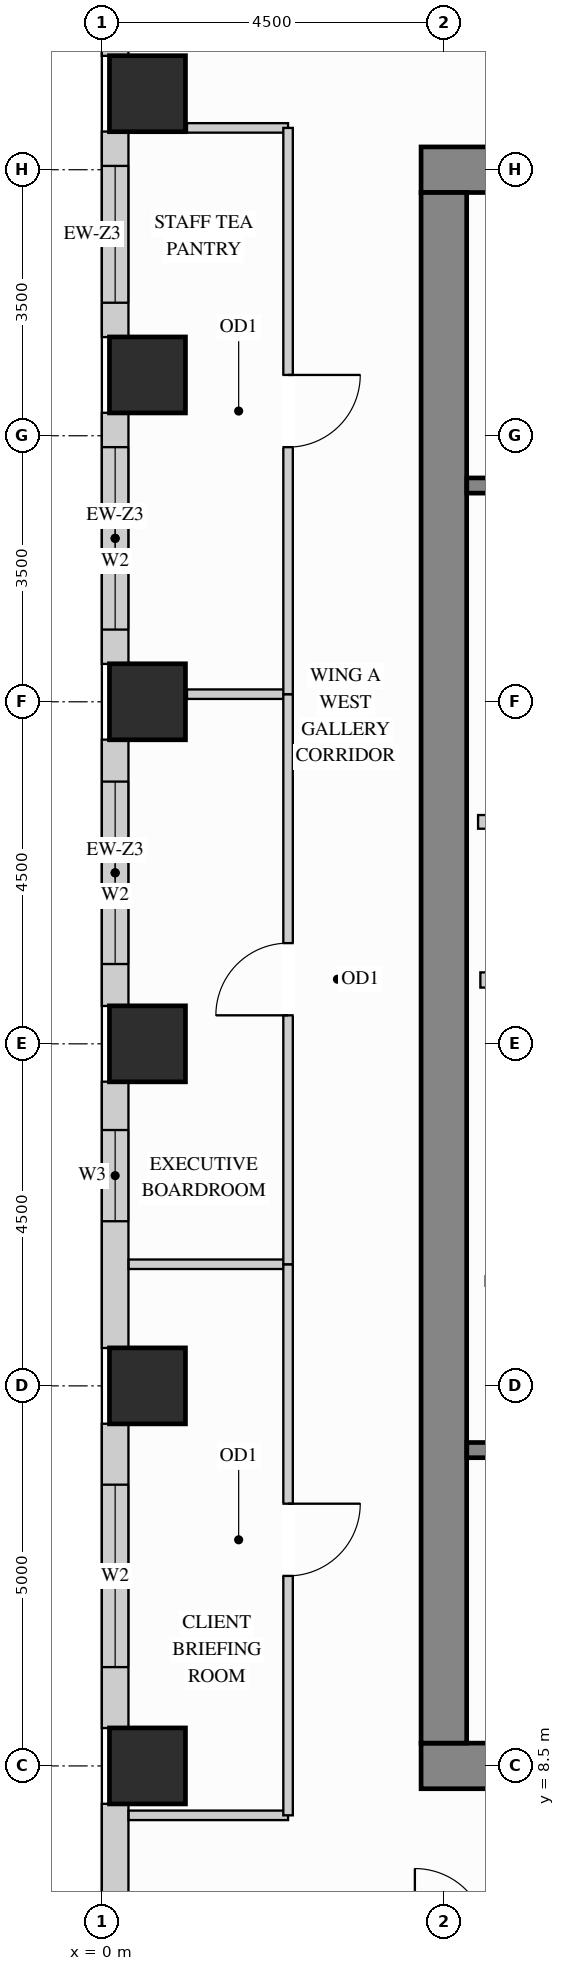
"""IFC4 building model, lengths in metres.
Left out: names, types, materials, properties, quantities, classifications, styles, units other than length and angle.
Written with IfcOpenShell. Run it as: python <this file> out.ifc"""

import sys

from ifc_helpers import new_model, si_unit, direction, frame, frame_2d, origin, origin_2d, place, context, subcontext, project, spatial, rectangle, extrude, source, transform, mapped, element, fill, save


model = new_model("IFC4")
c1 = context("Model", 3, precision=1e-05, world=origin(), true_north=direction((0.0, 1.0)))
c2 = subcontext(c1, "Body", "Model", "MODEL_VIEW")
j1 = project(units=[si_unit("LENGTHUNIT", "METRE"), si_unit("PLANEANGLEUNIT", "RADIAN")], contexts=[c1])
p1 = place(None, origin())
s1 = spatial("IfcSite", under=j1, at=p1, CompositionType="ELEMENT")
p2 = place(p1, origin())
s2 = spatial("IfcBuilding", under=s1, at=p2, CompositionType="ELEMENT")
p3 = place(p2, frame((0.0, 0.0, 189.9)))
s3 = spatial("IfcBuildingStorey", under=s2, at=p3, CompositionType="ELEMENT", Elevation=189.9)
m1 = source(origin(), c2, "Body", "SweptSolid", [
    extrude(rectangle(XDim=1.0, YDim=1.0, at=origin_2d()), origin(), (0.0, 0.0, 1.0), 3.4),
])
for number, where, z_axis, x_axis in (
    (1, (0.6, 13.5, 0.0), (0.0, 0.0, 1.0), (1.0, 0.0, 0.0)),
    (2, (0.6, 18.0, 0.0), (0.0, 0.0, 1.0), (1.0, 0.0, 0.0)),
    (3, (0.6, 22.5, 0.0), (0.0, 0.0, 1.0), (1.0, 0.0, 0.0)),
    (4, (0.6, 26.8, 0.0), (0.0, 0.0, 1.0), (1.0, 0.0, 0.0)),
    (5, (0.6, 30.5, 0.0), (0.0, 0.0, 1.0), (1.0, 0.0, 0.0)),
    (6, (0.6, 8.5, 0.0), (0.0, 0.0, 1.0), (1.0, 0.0, 0.0)),
):
    element("IfcColumn", number, at=place(p3, frame(where, z_axis=z_axis, x_axis=x_axis)), inside=s3, PredefinedType="COLUMN", context=c2, shape_type="MappedRepresentation", body=[
        mapped(m1, transform((0.0, 0.0, 0.0), x_axis=(1.0, 0.0, 0.0), y_axis=(0.0, 1.0, 0.0), z_axis=(0.0, 0.0, 1.0))),
    ])
m2 = source(origin(), c2, "Body", "SweptSolid", [
    extrude(rectangle(XDim=10.6, YDim=0.6, at=frame_2d((5.3, 0.0))), origin(), (0.0, 0.0, 1.0), 3.4),
])
for number, where, z_axis, x_axis in (
    (7, (4.2, 29.5, 0.0), (0.0, 0.0, 1.0), (1.0, 0.0, 0.0)),
    (8, (4.2, 8.5, 0.0), (0.0, 0.0, 1.0), (1.0, 0.0, 0.0)),
):
    element("IfcWall", number, at=place(p3, frame(where, z_axis=z_axis, x_axis=x_axis)), inside=s3, PredefinedType="SHEAR", context=c2, shape_type="MappedRepresentation", body=[
        mapped(m2, transform((0.0, 0.0, 0.0), x_axis=(1.0, 0.0, 0.0), y_axis=(0.0, 1.0, 0.0), z_axis=(0.0, 0.0, 1.0))),
    ])
m3 = source(origin(), c2, "Body", "SweptSolid", [
    extrude(rectangle(XDim=20.4, YDim=0.6, at=frame_2d((10.2, 0.0))), origin(), (0.0, 0.0, 1.0), 3.4),
])
p4 = place(p3, frame((4.5, 8.8, 0.0), z_axis=(0.0, 0.0, 1.0), x_axis=(0.0, 1.0, 0.0)))
e9 = element("IfcWall", 9, at=p4, inside=s3, PredefinedType="SHEAR", context=c2, shape_type="MappedRepresentation", body=[
    mapped(m3, transform((0.0, 0.0, 0.0), x_axis=(1.0, 0.0, 0.0), y_axis=(0.0, 1.0, 0.0), z_axis=(0.0, 0.0, 1.0))),
])
p5 = place(p3, frame((0.175, 34.502, 0.0), z_axis=(0.0, 0.0, 1.0), x_axis=(0.0, -1.0, 0.0)))
e10 = element("IfcWall", 10, at=p5, inside=s3, PredefinedType="SOLIDWALL", context=c2, shape_type="SweptSolid", body=[
    extrude(rectangle(XDim=3.504, YDim=0.35, at=frame_2d((1.752, 0.0))), origin(), (0.0, 0.0, 1.0), 2.612),
])
p6 = place(p5, frame((0.611, 0.0, 0.78)))
e11 = element("IfcOpeningElement", 11, at=p6, cuts=e10, PredefinedType="OPENING", context=c2, shape_type="SweptSolid", body=[
    extrude(rectangle(XDim=1.8, YDim=1.652, at=frame_2d((0.9, 0.826))), frame((0.0, 0.185, 0.0), z_axis=(0.0, -1.0, 0.0), x_axis=(1.0, 0.0, 0.0)), (0.0, 0.0, 1.0), 0.37),
])
p7 = place(p3, frame((0.175, 30.002, 0.0), z_axis=(0.0, 0.0, 1.0), x_axis=(0.0, -1.0, 0.0)))
e12 = element("IfcWall", 12, at=p7, inside=s3, PredefinedType="SOLIDWALL", context=c2, shape_type="SweptSolid", body=[
    extrude(rectangle(XDim=2.704, YDim=0.35, at=frame_2d((1.352, 0.0))), origin(), (0.0, 0.0, 1.0), 2.612),
])
p8 = place(p7, frame((0.452, 0.0, 0.78)))
e13 = element("IfcOpeningElement", 13, at=p8, cuts=e12, PredefinedType="OPENING", context=c2, shape_type="SweptSolid", body=[
    extrude(rectangle(XDim=1.8, YDim=1.652, at=frame_2d((0.9, 0.826))), frame((0.0, 0.185, 0.0), z_axis=(0.0, -1.0, 0.0), x_axis=(1.0, 0.0, 0.0)), (0.0, 0.0, 1.0), 0.37),
])
p9 = place(p3, frame((0.175, 26.302, 0.0), z_axis=(0.0, 0.0, 1.0), x_axis=(0.0, -1.0, 0.0)))
e14 = element("IfcWall", 14, at=p9, inside=s3, PredefinedType="SOLIDWALL", context=c2, shape_type="SweptSolid", body=[
    extrude(rectangle(XDim=3.304, YDim=0.35, at=frame_2d((1.652, 0.0))), origin(), (0.0, 0.0, 1.0), 2.612),
])
p10 = place(p9, frame((0.452, 0.0, 0.78)))
e15 = element("IfcOpeningElement", 15, at=p10, cuts=e14, PredefinedType="OPENING", context=c2, shape_type="SweptSolid", body=[
    extrude(rectangle(XDim=2.4, YDim=1.652, at=frame_2d((1.2, 0.826))), frame((0.0, 0.185, 0.0), z_axis=(0.0, -1.0, 0.0), x_axis=(1.0, 0.0, 0.0)), (0.0, 0.0, 1.0), 0.37),
])
p11 = place(p3, frame((0.175, 22.002, 0.0), z_axis=(0.0, 0.0, 1.0), x_axis=(0.0, -1.0, 0.0)))
e16 = element("IfcWall", 16, at=p11, inside=s3, PredefinedType="SOLIDWALL", context=c2, shape_type="SweptSolid", body=[
    extrude(rectangle(XDim=3.504, YDim=0.35, at=frame_2d((1.752, 0.0))), origin(), (0.0, 0.0, 1.0), 2.612),
])
p12 = place(p11, frame((0.552, 0.0, 0.78)))
e17 = element("IfcOpeningElement", 17, at=p12, cuts=e16, PredefinedType="OPENING", context=c2, shape_type="SweptSolid", body=[
    extrude(rectangle(XDim=2.4, YDim=1.652, at=frame_2d((1.2, 0.826))), frame((0.0, 0.185, 0.0), z_axis=(0.0, -1.0, 0.0), x_axis=(1.0, 0.0, 0.0)), (0.0, 0.0, 1.0), 0.37),
])
p13 = place(p3, frame((0.175, 17.502, 0.0), z_axis=(0.0, 0.0, 1.0), x_axis=(0.0, -1.0, 0.0)))
e18 = element("IfcWall", 18, at=p13, inside=s3, PredefinedType="SOLIDWALL", context=c2, shape_type="SweptSolid", body=[
    extrude(rectangle(XDim=3.504, YDim=0.35, at=frame_2d((1.752, 0.0))), origin(), (0.0, 0.0, 1.0), 2.612),
])
p14 = place(p13, frame((0.636, 0.0, 0.78)))
e19 = element("IfcOpeningElement", 19, at=p14, cuts=e18, PredefinedType="OPENING", context=c2, shape_type="SweptSolid", body=[
    extrude(rectangle(XDim=1.2, YDim=1.652, at=frame_2d((0.6, 0.826))), frame((0.0, 0.185, 0.0), z_axis=(0.0, -1.0, 0.0), x_axis=(1.0, 0.0, 0.0)), (0.0, 0.0, 1.0), 0.37),
])
p15 = place(p3, frame((0.175, 13.002, 0.0), z_axis=(0.0, 0.0, 1.0), x_axis=(0.0, -1.0, 0.0)))
e20 = element("IfcWall", 20, at=p15, inside=s3, PredefinedType="SOLIDWALL", context=c2, shape_type="SweptSolid", body=[
    extrude(rectangle(XDim=4.004, YDim=0.35, at=frame_2d((2.002, 0.0))), origin(), (0.0, 0.0, 1.0), 2.612),
])
p16 = place(p15, frame((0.802, 0.0, 0.78)))
e21 = element("IfcOpeningElement", 21, at=p16, cuts=e20, PredefinedType="OPENING", context=c2, shape_type="SweptSolid", body=[
    extrude(rectangle(XDim=2.4, YDim=1.652, at=frame_2d((1.2, 0.826))), frame((0.0, 0.185, 0.0), z_axis=(0.0, -1.0, 0.0), x_axis=(1.0, 0.0, 0.0)), (0.0, 0.0, 1.0), 0.37),
])
p17 = place(p3, frame((0.175, 8.002, 0.0), z_axis=(0.0, 0.0, 1.0), x_axis=(0.0, -1.0, 0.0)))
e22 = element("IfcWall", 22, at=p17, inside=s3, PredefinedType="SOLIDWALL", context=c2, shape_type="SweptSolid", body=[
    extrude(rectangle(XDim=4.004, YDim=0.35, at=frame_2d((2.002, 0.0))), origin(), (0.0, 0.0, 1.0), 2.612),
])
p18 = place(p17, frame((2.268, 0.0, 0.78)))
e23 = element("IfcOpeningElement", 23, at=p18, cuts=e22, PredefinedType="OPENING", context=c2, shape_type="SweptSolid", body=[
    extrude(rectangle(XDim=1.2, YDim=1.652, at=frame_2d((0.6, 0.826))), frame((0.0, 0.185, 0.0), z_axis=(0.0, -1.0, 0.0), x_axis=(1.0, 0.0, 0.0)), (0.0, 0.0, 1.0), 0.37),
])
m4 = source(origin(), c2, "Body", "SweptSolid", [
    extrude(rectangle(XDim=2.2, YDim=0.18, at=frame_2d((1.1, 0.0))), origin(), (0.0, 0.0, 1.0), 3.385),
])
p19 = place(p3, frame((4.95, 20.92, 0.0), z_axis=(0.0, 0.0, 1.0), x_axis=(1.0, 0.0, 0.0)))
e24 = element("IfcWall", 24, at=p19, inside=s3, PredefinedType="PARTITIONING", context=c2, shape_type="MappedRepresentation", body=[
    mapped(m4, transform((0.0, 0.0, 0.0), x_axis=(1.0, 0.0, 0.0), y_axis=(0.0, 1.0, 0.0), z_axis=(0.0, 0.0, 1.0))),
])
p20 = place(p3, frame((5.05, 14.88, 0.0), z_axis=(0.0, 0.0, 1.0), x_axis=(1.0, 0.0, 0.0)))
e25 = element("IfcWall", 25, at=p20, inside=s3, PredefinedType="PARTITIONING", context=c2, shape_type="SweptSolid", body=[
    extrude(rectangle(XDim=2.35, YDim=0.125, at=frame_2d((1.175, 0.0))), origin(), (0.0, 0.0, 1.0), 3.385),
])
p21 = place(p20, frame((0.7, 0.0, 0.0)))
e26 = element("IfcOpeningElement", 26, at=p21, cuts=e25, PredefinedType="OPENING", context=c2, shape_type="SweptSolid", body=[
    extrude(rectangle(XDim=0.85, YDim=2.1, at=frame_2d((0.425, 1.05))), frame((0.0, 0.073, 0.0), z_axis=(0.0, -1.0, 0.0), x_axis=(1.0, 0.0, 0.0)), (0.0, 0.0, 1.0), 0.145),
])
m5 = source(origin(), c2, "Body", "SweptSolid", [
    extrude(rectangle(XDim=1.33, YDim=0.125, at=frame_2d((0.665, 0.0))), origin(), (0.0, 0.0, 1.0), 3.385),
])
p22 = place(p3, frame((1.12, 30.05, 0.0), z_axis=(0.0, 0.0, 1.0), x_axis=(1.0, 0.0, 0.0)))
e27 = element("IfcWall", 27, at=p22, inside=s3, PredefinedType="PARTITIONING", context=c2, shape_type="MappedRepresentation", body=[
    mapped(m5, transform((0.0, 0.0, 0.0), x_axis=(1.0, 0.0, 0.0), y_axis=(0.0, 1.0, 0.0), z_axis=(0.0, 0.0, 1.0))),
])
m6 = source(origin(), c2, "Body", "SweptSolid", [
    extrude(rectangle(XDim=2.098, YDim=0.125, at=frame_2d((1.049, 0.0))), origin(), (0.0, 0.0, 1.0), 3.385),
])
for number, where, z_axis, x_axis in (
    (28, (0.352, 7.85, 0.0), (0.0, 0.0, 1.0), (1.0, 0.0, 0.0)),
    (29, (0.352, 15.1, 0.0), (0.0, 0.0, 1.0), (1.0, 0.0, 0.0)),
):
    element("IfcWall", number, at=place(p3, frame(where, z_axis=z_axis, x_axis=x_axis)), inside=s3, PredefinedType="PARTITIONING", context=c2, shape_type="MappedRepresentation", body=[
        mapped(m6, transform((0.0, 0.0, 0.0), x_axis=(1.0, 0.0, 0.0), y_axis=(0.0, 1.0, 0.0), z_axis=(0.0, 0.0, 1.0))),
    ])
p23 = place(p3, frame((1.12, 22.6, 0.0), z_axis=(0.0, 0.0, 1.0), x_axis=(1.0, 0.0, 0.0)))
e30 = element("IfcWall", 30, at=p23, inside=s3, PredefinedType="PARTITIONING", context=c2, shape_type="MappedRepresentation", body=[
    mapped(m5, transform((0.0, 0.0, 0.0), x_axis=(1.0, 0.0, 0.0), y_axis=(0.0, 1.0, 0.0), z_axis=(0.0, 0.0, 1.0))),
])
p24 = place(p3, frame((2.45, 7.85, 0.0), z_axis=(0.0, 0.0, 1.0), x_axis=(0.0, 1.0, 0.0)))
e31 = element("IfcWall", 31, at=p24, inside=s3, PredefinedType="PARTITIONING", context=c2, shape_type="SweptSolid", body=[
    extrude(rectangle(XDim=7.25, YDim=0.125, at=frame_2d((3.625, 0.0))), origin(), (0.0, 0.0, 1.0), 3.385),
])
p25 = place(p24, frame((3.15, 0.0, 0.0)))
e32 = element("IfcOpeningElement", 32, at=p25, cuts=e31, PredefinedType="OPENING", context=c2, shape_type="SweptSolid", body=[
    extrude(rectangle(XDim=0.95, YDim=2.15, at=frame_2d((0.475, 1.075))), frame((0.0, 0.073, 0.0), z_axis=(0.0, -1.0, 0.0), x_axis=(1.0, 0.0, 0.0)), (0.0, 0.0, 1.0), 0.145),
])
p26 = place(p3, frame((2.45, 15.1, 0.0), z_axis=(0.0, 0.0, 1.0), x_axis=(0.0, 1.0, 0.0)))
e33 = element("IfcWall", 33, at=p26, inside=s3, PredefinedType="PARTITIONING", context=c2, shape_type="SweptSolid", body=[
    extrude(rectangle(XDim=7.5, YDim=0.125, at=frame_2d((3.75, 0.0))), origin(), (0.0, 0.0, 1.0), 3.385),
])
p27 = place(p26, frame((3.275, 0.0, 0.0)))
e34 = element("IfcOpeningElement", 34, at=p27, cuts=e33, PredefinedType="OPENING", context=c2, shape_type="SweptSolid", body=[
    extrude(rectangle(XDim=0.95, YDim=2.15, at=frame_2d((0.475, 1.075))), frame((0.0, 0.073, 0.0), z_axis=(0.0, -1.0, 0.0), x_axis=(1.0, 0.0, 0.0)), (0.0, 0.0, 1.0), 0.145),
])
p28 = place(p3, frame((2.45, 22.6, 0.0), z_axis=(0.0, 0.0, 1.0), x_axis=(0.0, 1.0, 0.0)))
e35 = element("IfcWall", 35, at=p28, inside=s3, PredefinedType="PARTITIONING", context=c2, shape_type="SweptSolid", body=[
    extrude(rectangle(XDim=7.45, YDim=0.125, at=frame_2d((3.725, 0.0))), origin(), (0.0, 0.0, 1.0), 3.385),
])
p29 = place(p28, frame((3.25, 0.0, 0.0)))
e36 = element("IfcOpeningElement", 36, at=p29, cuts=e35, PredefinedType="OPENING", context=c2, shape_type="SweptSolid", body=[
    extrude(rectangle(XDim=0.95, YDim=2.15, at=frame_2d((0.475, 1.075))), frame((0.0, 0.073, 0.0), z_axis=(0.0, -1.0, 0.0), x_axis=(1.0, 0.0, 0.0)), (0.0, 0.0, 1.0), 0.145),
])
m7 = source(origin(), c2, "Body", "SweptSolid", [
    extrude(rectangle(XDim=2.09, YDim=0.2, at=frame_2d((1.045, 0.0))), origin(), (0.0, 0.0, 1.0), 3.385),
])
p30 = place(p3, frame((4.98, 18.84, 0.0), z_axis=(0.0, 0.0, 1.0), x_axis=(1.0, 0.0, 0.0)))
e37 = element("IfcWall", 37, at=p30, inside=s3, PredefinedType="PARTITIONING", context=c2, shape_type="MappedRepresentation", body=[
    mapped(m7, transform((0.0, 0.0, 0.0), x_axis=(1.0, 0.0, 0.0), y_axis=(0.0, 1.0, 0.0), z_axis=(0.0, 0.0, 1.0))),
])
p31 = place(p3, frame((4.802, 12.655, 0.0), z_axis=(0.0, 0.0, 1.0), x_axis=(1.0, 0.0, 0.0)))
e38 = element("IfcWall", 38, at=p31, inside=s3, PredefinedType="SHEAR", context=c2, shape_type="SweptSolid", body=[
    extrude(rectangle(XDim=7.603, YDim=0.2, at=frame_2d((3.802, 0.0))), origin(), (0.0, 0.0, 1.0), 3.4),
])
p32 = place(p31, frame((0.4, 0.0, 0.0)))
e39 = element("IfcOpeningElement", 39, at=p32, cuts=e38, PredefinedType="OPENING", context=c2, shape_type="SweptSolid", body=[
    extrude(rectangle(XDim=1.1, YDim=2.15, at=frame_2d((0.55, 1.075))), frame((0.0, 0.11, 0.0), z_axis=(0.0, -1.0, 0.0), x_axis=(1.0, 0.0, 0.0)), (0.0, 0.0, 1.0), 0.22),
])
p33 = place(p3, frame((4.802, 25.345, 0.0), z_axis=(0.0, 0.0, 1.0), x_axis=(1.0, 0.0, 0.0)))
e40 = element("IfcWall", 40, at=p33, inside=s3, PredefinedType="SHEAR", context=c2, shape_type="SweptSolid", body=[
    extrude(rectangle(XDim=7.603, YDim=0.2, at=frame_2d((3.802, 0.0))), origin(), (0.0, 0.0, 1.0), 3.4),
])
p34 = place(p33, frame((0.4, 0.0, 0.0)))
e41 = element("IfcOpeningElement", 41, at=p34, cuts=e40, PredefinedType="OPENING", context=c2, shape_type="SweptSolid", body=[
    extrude(rectangle(XDim=1.1, YDim=2.15, at=frame_2d((0.55, 1.075))), frame((0.0, 0.11, 0.0), z_axis=(0.0, -1.0, 0.0), x_axis=(1.0, 0.0, 0.0)), (0.0, 0.0, 1.0), 0.22),
])
m8 = source(origin(), c2, "Body", "SweptSolid", [
    extrude(rectangle(XDim=0.95, YDim=2.15, at=frame_2d((0.475, 1.075))), frame((0.0, 0.025, 0.0), z_axis=(0.0, -1.0, 0.0), x_axis=(1.0, 0.0, 0.0)), (0.0, 0.0, 1.0), 0.05),
])
p35 = place(p25, origin())
e42 = element("IfcDoor", 42, at=p35, inside=s3, OperationType="SINGLE_SWING_RIGHT", PredefinedType="DOOR", context=c2, shape_type="MappedRepresentation", body=[
    mapped(m8, transform((0.0, 0.0, 0.0), x_axis=(1.0, 0.0, 0.0), y_axis=(0.0, 1.0, 0.0), z_axis=(0.0, 0.0, 1.0))),
])
fill(e32, e42)
p36 = place(p27, origin())
e43 = element("IfcDoor", 43, at=p36, inside=s3, OperationType="SINGLE_SWING_LEFT", PredefinedType="DOOR", context=c2, shape_type="MappedRepresentation", body=[
    mapped(m8, transform((0.0, 0.0, 0.0), x_axis=(1.0, 0.0, 0.0), y_axis=(0.0, 1.0, 0.0), z_axis=(0.0, 0.0, 1.0))),
])
fill(e34, e43)
p37 = place(p29, origin())
e44 = element("IfcDoor", 44, at=p37, inside=s3, OperationType="SINGLE_SWING_RIGHT", PredefinedType="DOOR", context=c2, shape_type="MappedRepresentation", body=[
    mapped(m8, transform((0.0, 0.0, 0.0), x_axis=(1.0, 0.0, 0.0), y_axis=(0.0, 1.0, 0.0), z_axis=(0.0, 0.0, 1.0))),
])
fill(e36, e44)
m9 = source(origin(), c2, "Body", "SweptSolid", [
    extrude(rectangle(XDim=1.8, YDim=1.652, at=frame_2d((0.9, 0.826))), frame((0.0, 0.03, 0.0), z_axis=(0.0, -1.0, 0.0), x_axis=(1.0, 0.0, 0.0)), (0.0, 0.0, 1.0), 0.06),
])
p38 = place(p8, origin())
e45 = element("IfcWindow", 45, at=p38, inside=s3, PartitioningType="SINGLE_PANEL", PredefinedType="WINDOW", context=c2, shape_type="MappedRepresentation", body=[
    mapped(m9, transform((0.0, 0.0, 0.0), x_axis=(1.0, 0.0, 0.0), y_axis=(0.0, 1.0, 0.0), z_axis=(0.0, 0.0, 1.0))),
])
fill(e13, e45)
m10 = source(origin(), c2, "Body", "SweptSolid", [
    extrude(rectangle(XDim=2.4, YDim=1.652, at=frame_2d((1.2, 0.826))), frame((0.0, 0.03, 0.0), z_axis=(0.0, -1.0, 0.0), x_axis=(1.0, 0.0, 0.0)), (0.0, 0.0, 1.0), 0.06),
])
p39 = place(p10, origin())
e46 = element("IfcWindow", 46, at=p39, inside=s3, PartitioningType="SINGLE_PANEL", PredefinedType="WINDOW", context=c2, shape_type="MappedRepresentation", body=[
    mapped(m10, transform((0.0, 0.0, 0.0), x_axis=(1.0, 0.0, 0.0), y_axis=(0.0, 1.0, 0.0), z_axis=(0.0, 0.0, 1.0))),
])
fill(e15, e46)
p40 = place(p12, origin())
e47 = element("IfcWindow", 47, at=p40, inside=s3, PartitioningType="SINGLE_PANEL", PredefinedType="WINDOW", context=c2, shape_type="MappedRepresentation", body=[
    mapped(m10, transform((0.0, 0.0, 0.0), x_axis=(1.0, 0.0, 0.0), y_axis=(0.0, 1.0, 0.0), z_axis=(0.0, 0.0, 1.0))),
])
fill(e17, e47)
p41 = place(p16, origin())
e48 = element("IfcWindow", 48, at=p41, inside=s3, PartitioningType="SINGLE_PANEL", PredefinedType="WINDOW", context=c2, shape_type="MappedRepresentation", body=[
    mapped(m10, transform((0.0, 0.0, 0.0), x_axis=(1.0, 0.0, 0.0), y_axis=(0.0, 1.0, 0.0), z_axis=(0.0, 0.0, 1.0))),
])
fill(e21, e48)
m11 = source(origin(), c2, "Body", "SweptSolid", [
    extrude(rectangle(XDim=1.2, YDim=1.652, at=frame_2d((0.6, 0.826))), frame((0.0, 0.03, 0.0), z_axis=(0.0, -1.0, 0.0), x_axis=(1.0, 0.0, 0.0)), (0.0, 0.0, 1.0), 0.06),
])
p42 = place(p14, origin())
e49 = element("IfcWindow", 49, at=p42, inside=s3, PartitioningType="SINGLE_PANEL", PredefinedType="WINDOW", context=c2, shape_type="MappedRepresentation", body=[
    mapped(m11, transform((0.0, 0.0, 0.0), x_axis=(1.0, 0.0, 0.0), y_axis=(0.0, 1.0, 0.0), z_axis=(0.0, 0.0, 1.0))),
])
fill(e19, e49)
save(model, sys.argv[1])
